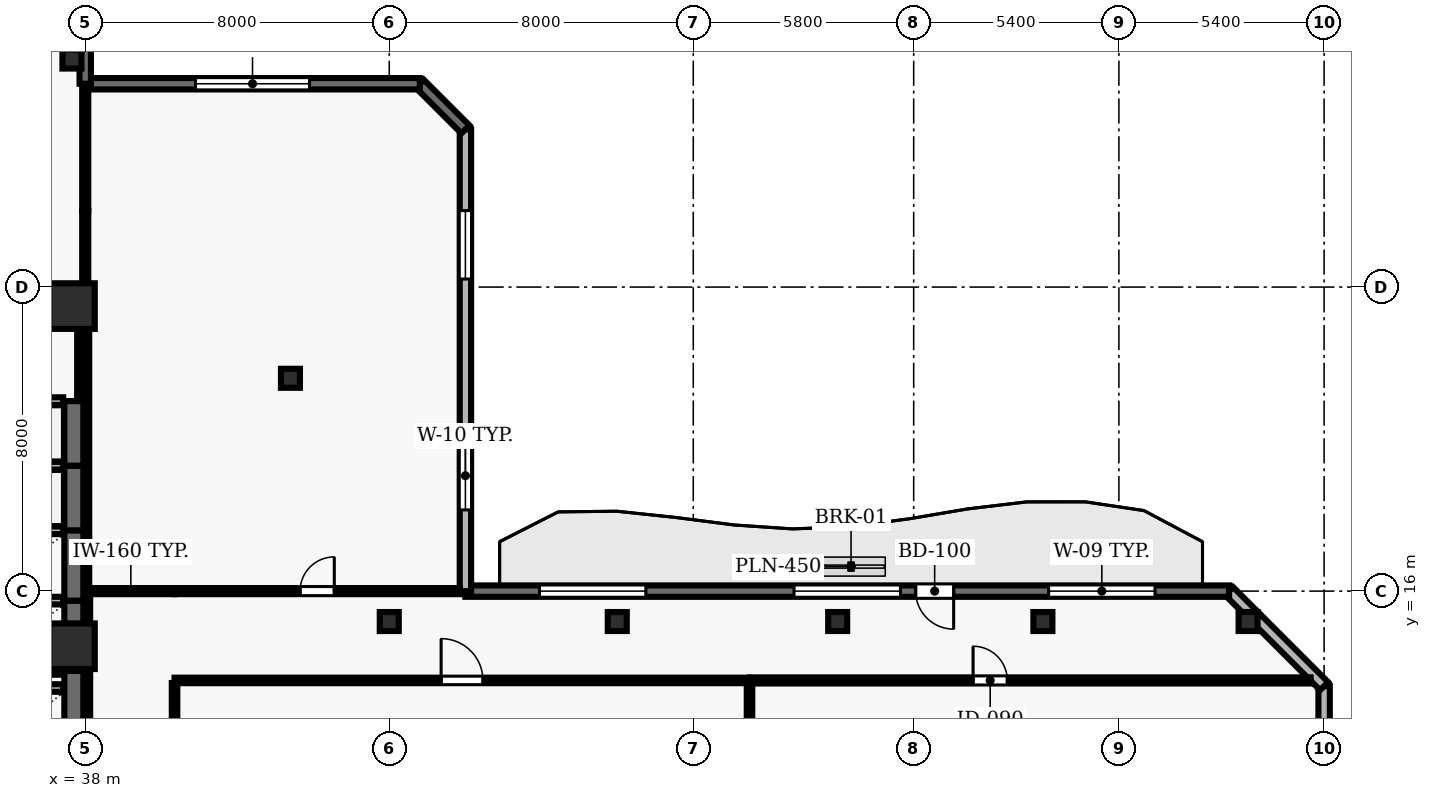
"""IFC4 building model, lengths in metres.
Left out: names, types, materials, properties, quantities, classifications, styles, units other than length and angle.
Written with IfcOpenShell. Run it as: python <this file> out.ifc"""

import sys

from ifc_helpers import new_model, si_unit, direction, frame, frame_2d, origin, origin_2d, place, context, subcontext, project, spatial, rectangle, hollow_rectangle, extrude, element, fill, save


model = new_model("IFC4")
c1 = context("Model", 3, precision=1e-05, world=origin(), true_north=direction((0.0, 1.0)))
c2 = subcontext(c1, "Body", "Model", "MODEL_VIEW")
j1 = project(units=[si_unit("LENGTHUNIT", "METRE"), si_unit("PLANEANGLEUNIT", "RADIAN")], contexts=[c1])
p1 = place(None, origin())
s1 = spatial("IfcSite", under=j1, at=p1, CompositionType="ELEMENT")
p2 = place(p1, origin())
s2 = spatial("IfcBuilding", under=s1, at=p2, CompositionType="ELEMENT")
p3 = place(p2, frame((0.0, 0.0, 119.0)))
s3 = spatial("IfcBuildingStorey", under=s2, at=p3, CompositionType="ELEMENT", Elevation=119.0)
for number, where, z_axis, x_axis in (
    (1, (37.65, 14.55, 0.0), (0.0, 0.0, 1.0), (1.0, 0.0, 0.0)),
    (2, (37.65, 23.5, 0.0), (0.0, 0.0, 1.0), (1.0, 0.0, 0.0)),
):
    element("IfcColumn", number, at=place(p3, frame(where, z_axis=z_axis, x_axis=x_axis)), inside=s3, PredefinedType="COLUMN", context=c2, shape_type="SweptSolid", body=[
        extrude(rectangle(XDim=1.2, YDim=1.2, at=origin_2d()), origin(), (0.0, 0.0, 1.0), 3.9),
    ])
for number, where, z_axis, x_axis in (
    (3, (46.0, 15.2, 0.0), (0.0, 0.0, 1.0), (1.0, 0.0, 0.0)),
    (4, (52.0, 15.2, 0.0), (0.0, 0.0, 1.0), (1.0, 0.0, 0.0)),
    (5, (57.8, 15.2, 0.0), (0.0, 0.0, 1.0), (1.0, 0.0, 0.0)),
    (6, (63.2, 15.2, 0.0), (0.0, 0.0, 1.0), (1.0, 0.0, 0.0)),
    (7, (68.6, 15.2, 0.0), (0.0, 0.0, 1.0), (1.0, 0.0, 0.0)),
    (8, (37.65, 30.0, 0.0), (0.0, 0.0, 1.0), (1.0, 0.0, 0.0)),
    (9, (43.4, 21.6, 0.0), (0.0, 0.0, 1.0), (1.0, 0.0, 0.0)),
):
    element("IfcColumn", number, at=place(p3, frame(where, z_axis=z_axis, x_axis=x_axis)), inside=s3, PredefinedType="COLUMN", context=c2, shape_type="SweptSolid", body=[
        extrude(hollow_rectangle(XDim=0.5, YDim=0.5, WallThickness=0.025, at=origin_2d()), origin(), (0.0, 0.0, 1.0), 3.9),
    ])
p4 = place(p3, frame((70.6, 2.5, 0.0), z_axis=(0.0, 0.0, 1.0), x_axis=(0.0, 1.0, 0.0)))
e10 = element("IfcWall", 10, at=p4, inside=s3, PredefinedType="SOLIDWALL", context=c2, shape_type="SweptSolid", body=[
    extrude(rectangle(XDim=11.0, YDim=0.3, at=frame_2d((5.5, 0.0))), origin(), (0.0, 0.0, 1.0), 3.69),
])
p5 = place(p4, frame((1.85, 0.0, 0.9)))
e11 = element("IfcOpeningElement", 11, at=p5, cuts=e10, PredefinedType="OPENING", context=c2, shape_type="SweptSolid", body=[
    extrude(rectangle(XDim=1.8, YDim=1.8, at=frame_2d((0.9, 0.9))), frame((0.0, 0.16, 0.0), z_axis=(0.0, -1.0, 0.0), x_axis=(1.0, 0.0, 0.0)), (0.0, 0.0, 1.0), 0.32),
])
p6 = place(p4, frame((7.35, 0.0, 0.9)))
e12 = element("IfcOpeningElement", 12, at=p6, cuts=e10, PredefinedType="OPENING", context=c2, shape_type="SweptSolid", body=[
    extrude(rectangle(XDim=1.8, YDim=1.8, at=frame_2d((0.9, 0.9))), frame((0.0, 0.16, 0.0), z_axis=(0.0, -1.0, 0.0), x_axis=(1.0, 0.0, 0.0)), (0.0, 0.0, 1.0), 0.32),
])
p7 = place(p3, frame((70.6, 13.5, 0.0), z_axis=(0.0, 0.0, 1.0), x_axis=(-0.707106781187, 0.707106781187, 0.0)))
e13 = element("IfcWall", 13, at=p7, inside=s3, PredefinedType="SOLIDWALL", context=c2, shape_type="SweptSolid", body=[
    extrude(rectangle(XDim=3.536, YDim=0.3, at=frame_2d((1.768, 0.0))), origin(), (0.0, 0.0, 1.0), 3.69),
])
p8 = place(p3, frame((68.1, 16.0, 0.0), z_axis=(0.0, 0.0, 1.0), x_axis=(-1.0, 0.0, 0.0)))
e14 = element("IfcWall", 14, at=p8, inside=s3, PredefinedType="SOLIDWALL", context=c2, shape_type="SweptSolid", body=[
    extrude(rectangle(XDim=20.096, YDim=0.3, at=frame_2d((10.048, 0.0))), origin(), (0.0, 0.0, 1.0), 3.69),
])
p9 = place(p8, frame((7.248, 0.0, 0.0)))
e15 = element("IfcOpeningElement", 15, at=p9, cuts=e14, PredefinedType="OPENING", context=c2, shape_type="SweptSolid", body=[
    extrude(rectangle(XDim=1.0, YDim=2.2, at=frame_2d((0.5, 1.1))), frame((0.0, 0.16, 0.0), z_axis=(0.0, -1.0, 0.0), x_axis=(1.0, 0.0, 0.0)), (0.0, 0.0, 1.0), 0.32),
])
p10 = place(p8, frame((1.949, 0.0, 0.9)))
e16 = element("IfcOpeningElement", 16, at=p10, cuts=e14, PredefinedType="OPENING", context=c2, shape_type="SweptSolid", body=[
    extrude(rectangle(XDim=2.8, YDim=1.8, at=frame_2d((1.4, 0.9))), frame((0.0, 0.16, 0.0), z_axis=(0.0, -1.0, 0.0), x_axis=(1.0, 0.0, 0.0)), (0.0, 0.0, 1.0), 0.32),
])
p11 = place(p8, frame((8.648, 0.0, 0.9)))
e17 = element("IfcOpeningElement", 17, at=p11, cuts=e14, PredefinedType="OPENING", context=c2, shape_type="SweptSolid", body=[
    extrude(rectangle(XDim=2.8, YDim=1.8, at=frame_2d((1.4, 0.9))), frame((0.0, 0.16, 0.0), z_axis=(0.0, -1.0, 0.0), x_axis=(1.0, 0.0, 0.0)), (0.0, 0.0, 1.0), 0.32),
])
p12 = place(p8, frame((15.347, 0.0, 0.9)))
e18 = element("IfcOpeningElement", 18, at=p12, cuts=e14, PredefinedType="OPENING", context=c2, shape_type="SweptSolid", body=[
    extrude(rectangle(XDim=2.8, YDim=1.8, at=frame_2d((1.4, 0.9))), frame((0.0, 0.16, 0.0), z_axis=(0.0, -1.0, 0.0), x_axis=(1.0, 0.0, 0.0)), (0.0, 0.0, 1.0), 0.32),
])
p13 = place(p3, frame((48.004, 16.0, 0.0), z_axis=(0.0, 0.0, 1.0), x_axis=(0.0, 1.0, 0.0)))
e19 = element("IfcWall", 19, at=p13, inside=s3, PredefinedType="SOLIDWALL", context=c2, shape_type="SweptSolid", body=[
    extrude(rectangle(XDim=12.15, YDim=0.3, at=frame_2d((6.075, 0.0))), origin(), (0.0, 0.0, 1.0), 3.69),
])
p14 = place(p13, frame((2.137, 0.0, 0.9)))
e20 = element("IfcOpeningElement", 20, at=p14, cuts=e19, PredefinedType="OPENING", context=c2, shape_type="SweptSolid", body=[
    extrude(rectangle(XDim=1.8, YDim=2.2, at=frame_2d((0.9, 1.1))), frame((0.0, 0.16, 0.0), z_axis=(0.0, -1.0, 0.0), x_axis=(1.0, 0.0, 0.0)), (0.0, 0.0, 1.0), 0.32),
])
p15 = place(p13, frame((8.212, 0.0, 0.9)))
e21 = element("IfcOpeningElement", 21, at=p15, cuts=e19, PredefinedType="OPENING", context=c2, shape_type="SweptSolid", body=[
    extrude(rectangle(XDim=1.8, YDim=2.2, at=frame_2d((0.9, 1.1))), frame((0.0, 0.16, 0.0), z_axis=(0.0, -1.0, 0.0), x_axis=(1.0, 0.0, 0.0)), (0.0, 0.0, 1.0), 0.32),
])
p16 = place(p3, frame((48.004, 28.15, 0.0), z_axis=(0.0, 0.0, 1.0), x_axis=(-0.707034851297, 0.707178703759, 0.0)))
e22 = element("IfcWall", 22, at=p16, inside=s3, PredefinedType="SOLIDWALL", context=c2, shape_type="SweptSolid", body=[
    extrude(rectangle(XDim=1.697, YDim=0.3, at=frame_2d((0.849, 0.0))), origin(), (0.0, 0.0, 1.0), 3.69),
])
p17 = place(p3, frame((46.804, 29.35, 0.0), z_axis=(0.0, 0.0, 1.0), x_axis=(-1.0, 0.0, 0.0)))
e23 = element("IfcWall", 23, at=p17, inside=s3, PredefinedType="SOLIDWALL", context=c2, shape_type="SweptSolid", body=[
    extrude(rectangle(XDim=8.804, YDim=0.3, at=frame_2d((4.402, 0.0))), origin(), (0.0, 0.0, 1.0), 3.69),
])
p18 = place(p17, frame((2.902, 0.0, 0.9)))
e24 = element("IfcOpeningElement", 24, at=p18, cuts=e23, PredefinedType="OPENING", context=c2, shape_type="SweptSolid", body=[
    extrude(rectangle(XDim=3.0, YDim=2.2, at=frame_2d((1.5, 1.1))), frame((0.0, 0.16, 0.0), z_axis=(0.0, -1.0, 0.0), x_axis=(1.0, 0.0, 0.0)), (0.0, 0.0, 1.0), 0.32),
])
p19 = place(p3, frame((38.0, 29.35, 0.0), z_axis=(0.0, 0.0, 1.0), x_axis=(0.0, 1.0, 0.0)))
e25 = element("IfcWall", 25, at=p19, inside=s3, PredefinedType="SOLIDWALL", context=c2, shape_type="SweptSolid", body=[
    extrude(rectangle(XDim=16.75, YDim=0.3, at=frame_2d((8.375, 0.0))), origin(), (0.0, 0.0, 1.0), 3.69),
])
p20 = place(p19, frame((7.975, 0.0, 0.0)))
e26 = element("IfcOpeningElement", 26, at=p20, cuts=e25, PredefinedType="OPENING", context=c2, shape_type="SweptSolid", body=[
    extrude(rectangle(XDim=1.0, YDim=2.2, at=frame_2d((0.5, 1.1))), frame((0.0, 0.16, 0.0), z_axis=(0.0, -1.0, 0.0), x_axis=(1.0, 0.0, 0.0)), (0.0, 0.0, 1.0), 0.32),
])
p21 = place(p19, frame((2.192, 0.0, 0.9)))
e27 = element("IfcOpeningElement", 27, at=p21, cuts=e25, PredefinedType="OPENING", context=c2, shape_type="SweptSolid", body=[
    extrude(rectangle(XDim=1.2, YDim=1.6, at=frame_2d((0.6, 0.8))), frame((0.0, 0.16, 0.0), z_axis=(0.0, -1.0, 0.0), x_axis=(1.0, 0.0, 0.0)), (0.0, 0.0, 1.0), 0.32),
])
p22 = place(p19, frame((13.358, 0.0, 0.9)))
e28 = element("IfcOpeningElement", 28, at=p22, cuts=e25, PredefinedType="OPENING", context=c2, shape_type="SweptSolid", body=[
    extrude(rectangle(XDim=1.2, YDim=1.6, at=frame_2d((0.6, 0.8))), frame((0.0, 0.16, 0.0), z_axis=(0.0, -1.0, 0.0), x_axis=(1.0, 0.0, 0.0)), (0.0, 0.0, 1.0), 0.32),
])
p23 = place(p3, frame((37.7, 11.55, 0.0), z_axis=(0.0, 0.0, 1.0), x_axis=(0.0, 1.0, 0.0)))
e29 = element("IfcWall", 29, at=p23, inside=s3, PredefinedType="SHEAR", context=c2, shape_type="SweptSolid", body=[
    extrude(rectangle(XDim=2.35, YDim=0.5, at=frame_2d((1.175, 0.0))), origin(), (0.0, 0.0, 1.0), 3.69),
])
p24 = place(p3, frame((37.42, 13.45, 0.0), z_axis=(0.0, 0.0, 1.0), x_axis=(-1.0, 0.0, 0.0)))
e30 = element("IfcWall", 30, at=p24, inside=s3, PredefinedType="SOLIDWALL", context=c2, shape_type="SweptSolid", body=[
    extrude(rectangle(XDim=2.14, YDim=0.2, at=frame_2d((1.07, 0.0))), origin(), (0.0, 0.0, 1.0), 3.69),
])
p25 = place(p3, frame((37.7, 13.9, 0.0), z_axis=(0.0, 0.0, 1.0), x_axis=(0.0, 1.0, 0.0)))
e31 = element("IfcWall", 31, at=p25, inside=s3, PredefinedType="SHEAR", context=c2, shape_type="SweptSolid", body=[
    extrude(rectangle(XDim=1.85, YDim=0.5, at=frame_2d((0.925, 0.0))), origin(), (0.0, 0.0, 1.0), 3.69),
])
for number, where, z_axis, x_axis in (
    (32, (35.28, 13.9, 0.0), (0.0, 0.0, 1.0), (1.0, 0.0, 0.0)),
    (33, (37.42, 15.75, 0.0), (0.0, 0.0, 1.0), (-1.0, 0.0, 0.0)),
):
    element("IfcWall", number, at=place(p3, frame(where, z_axis=z_axis, x_axis=x_axis)), inside=s3, PredefinedType="SOLIDWALL", context=c2, shape_type="SweptSolid", body=[
        extrude(rectangle(XDim=2.14, YDim=0.2, at=frame_2d((1.07, 0.0))), origin(), (0.0, 0.0, 1.0), 3.69),
    ])
p26 = place(p3, frame((37.7, 15.75, 0.0), z_axis=(0.0, 0.0, 1.0), x_axis=(0.0, 1.0, 0.0)))
e34 = element("IfcWall", 34, at=p26, inside=s3, PredefinedType="SHEAR", context=c2, shape_type="SweptSolid", body=[
    extrude(rectangle(XDim=1.85, YDim=0.5, at=frame_2d((0.925, 0.0))), origin(), (0.0, 0.0, 1.0), 3.69),
])
p27 = place(p3, frame((37.42, 17.6, 0.0), z_axis=(0.0, 0.0, 1.0), x_axis=(-1.0, 0.0, 0.0)))
e35 = element("IfcWall", 35, at=p27, inside=s3, PredefinedType="SOLIDWALL", context=c2, shape_type="SweptSolid", body=[
    extrude(rectangle(XDim=2.14, YDim=0.2, at=frame_2d((1.07, 0.0))), origin(), (0.0, 0.0, 1.0), 3.69),
])
p28 = place(p3, frame((37.7, 17.6, 0.0), z_axis=(0.0, 0.0, 1.0), x_axis=(0.0, 1.0, 0.0)))
e36 = element("IfcWall", 36, at=p28, inside=s3, PredefinedType="SHEAR", context=c2, shape_type="SweptSolid", body=[
    extrude(rectangle(XDim=1.7, YDim=0.5, at=frame_2d((0.85, 0.0))), origin(), (0.0, 0.0, 1.0), 3.69),
])
p29 = place(p3, frame((37.42, 19.3, 0.0), z_axis=(0.0, 0.0, 1.0), x_axis=(-1.0, 0.0, 0.0)))
e37 = element("IfcWall", 37, at=p29, inside=s3, PredefinedType="SOLIDWALL", context=c2, shape_type="SweptSolid", body=[
    extrude(rectangle(XDim=2.14, YDim=0.2, at=frame_2d((1.07, 0.0))), origin(), (0.0, 0.0, 1.0), 3.69),
])
p30 = place(p3, frame((37.7, 19.3, 0.0), z_axis=(0.0, 0.0, 1.0), x_axis=(0.0, 1.0, 0.0)))
e38 = element("IfcWall", 38, at=p30, inside=s3, PredefinedType="SHEAR", context=c2, shape_type="SweptSolid", body=[
    extrude(rectangle(XDim=1.7, YDim=0.5, at=frame_2d((0.85, 0.0))), origin(), (0.0, 0.0, 1.0), 3.69),
])
p31 = place(p3, frame((37.42, 21.0, 0.0), z_axis=(0.0, 0.0, 1.0), x_axis=(-1.0, 0.0, 0.0)))
e39 = element("IfcWall", 39, at=p31, inside=s3, PredefinedType="SOLIDWALL", context=c2, shape_type="SweptSolid", body=[
    extrude(rectangle(XDim=2.14, YDim=0.2, at=frame_2d((1.07, 0.0))), origin(), (0.0, 0.0, 1.0), 3.69),
])
p32 = place(p3, frame((37.85, 23.85, 0.0), z_axis=(0.0, 0.0, 1.0), x_axis=(-1.0, 0.0, 0.0)))
e40 = element("IfcWall", 40, at=p32, inside=s3, PredefinedType="PARTITIONING", context=c2, shape_type="SweptSolid", body=[
    extrude(rectangle(XDim=4.0, YDim=0.16, at=frame_2d((2.0, 0.0))), origin(), (0.0, 0.0, 1.0), 3.074),
])
p33 = place(p32, frame((2.25, 0.0, 0.0)))
e41 = element("IfcOpeningElement", 41, at=p33, cuts=e40, PredefinedType="OPENING", context=c2, shape_type="SweptSolid", body=[
    extrude(rectangle(XDim=0.9, YDim=2.1, at=frame_2d((0.45, 1.05))), frame((0.0, 0.09, 0.0), z_axis=(0.0, -1.0, 0.0), x_axis=(1.0, 0.0, 0.0)), (0.0, 0.0, 1.0), 0.18),
])
p34 = place(p3, frame((40.35, 13.65, 0.0), z_axis=(0.0, 0.0, 1.0), x_axis=(1.0, 0.0, 0.0)))
e42 = element("IfcWall", 42, at=p34, inside=s3, PredefinedType="PARTITIONING", context=c2, shape_type="SweptSolid", body=[
    extrude(rectangle(XDim=15.13, YDim=0.145, at=frame_2d((7.565, 0.0))), origin(), (0.0, 0.0, 1.0), 3.69),
])
p35 = place(p34, frame((7.015, 0.0, 0.0)))
e43 = element("IfcOpeningElement", 43, at=p35, cuts=e42, PredefinedType="OPENING", context=c2, shape_type="SweptSolid", body=[
    extrude(rectangle(XDim=1.1, YDim=2.15, at=frame_2d((0.55, 1.075))), frame((0.0, 0.083, 0.0), z_axis=(0.0, -1.0, 0.0), x_axis=(1.0, 0.0, 0.0)), (0.0, 0.0, 1.0), 0.165),
])
p36 = place(p3, frame((40.35, 16.0, 0.0), z_axis=(0.0, 0.0, 1.0), x_axis=(-1.0, 0.0, 0.0)))
e44 = element("IfcWall", 44, at=p36, inside=s3, PredefinedType="PARTITIONING", context=c2, shape_type="SweptSolid", body=[
    extrude(rectangle(XDim=2.3, YDim=0.16, at=frame_2d((1.15, 0.0))), origin(), (0.0, 0.0, 1.0), 3.69),
])
p37 = place(p3, frame((40.35, 16.0, 0.0), z_axis=(0.0, 0.0, 1.0), x_axis=(1.0, 0.0, 0.0)))
e45 = element("IfcWall", 45, at=p37, inside=s3, PredefinedType="PARTITIONING", context=c2, shape_type="SweptSolid", body=[
    extrude(rectangle(XDim=7.509, YDim=0.16, at=frame_2d((3.754, 0.0))), origin(), (0.0, 0.0, 1.0), 3.39),
])
p38 = place(p37, frame((3.304, 0.0, 0.0)))
e46 = element("IfcOpeningElement", 46, at=p38, cuts=e45, PredefinedType="OPENING", context=c2, shape_type="SweptSolid", body=[
    extrude(rectangle(XDim=0.9, YDim=2.1, at=frame_2d((0.45, 1.05))), frame((0.0, 0.09, 0.0), z_axis=(0.0, -1.0, 0.0), x_axis=(1.0, 0.0, 0.0)), (0.0, 0.0, 1.0), 0.18),
])
p39 = place(p3, frame((55.48, 13.65, 0.0), z_axis=(0.0, 0.0, 1.0), x_axis=(1.0, 0.0, 0.0)))
e47 = element("IfcWall", 47, at=p39, inside=s3, PredefinedType="PARTITIONING", context=c2, shape_type="SweptSolid", body=[
    extrude(rectangle(XDim=14.765, YDim=0.16, at=frame_2d((7.383, 0.0))), origin(), (0.0, 0.0, 1.0), 3.69),
])
p40 = place(p39, frame((5.883, 0.0, 0.0)))
e48 = element("IfcOpeningElement", 48, at=p40, cuts=e47, PredefinedType="OPENING", context=c2, shape_type="SweptSolid", body=[
    extrude(rectangle(XDim=0.9, YDim=2.1, at=frame_2d((0.45, 1.05))), frame((0.0, 0.09, 0.0), z_axis=(0.0, -1.0, 0.0), x_axis=(1.0, 0.0, 0.0)), (0.0, 0.0, 1.0), 0.18),
])
p41 = place(p3, frame((37.85, 21.0, 0.0), z_axis=(0.0, 0.0, 1.0), x_axis=(0.0, 1.0, 0.0)))
e49 = element("IfcWall", 49, at=p41, inside=s3, PredefinedType="PARTITIONING", context=c2, shape_type="SweptSolid", body=[
    extrude(rectangle(XDim=2.775, YDim=0.125, at=frame_2d((1.387, 0.0))), origin(), (0.0, 0.0, 1.0), 3.074),
])
p42 = place(p3, frame((38.0, 23.85, 0.0), z_axis=(0.0, 0.0, 1.0), x_axis=(0.0, 1.0, 0.0)))
e50 = element("IfcWall", 50, at=p42, inside=s3, PredefinedType="PARTITIONING", context=c2, shape_type="SweptSolid", body=[
    extrude(rectangle(XDim=2.15, YDim=0.16, at=frame_2d((1.075, 0.0))), origin(), (0.0, 0.0, 1.0), 3.074),
])
p43 = place(p3, frame((38.0, 26.0, 0.0), z_axis=(0.0, 0.0, 1.0), x_axis=(0.0, 1.0, 0.0)))
e51 = element("IfcWall", 51, at=p43, inside=s3, PredefinedType="PARTITIONING", context=c2, shape_type="SweptSolid", body=[
    extrude(rectangle(XDim=3.205, YDim=0.16, at=frame_2d((1.603, 0.0))), origin(), (0.0, 0.0, 1.0), 3.074),
])
p44 = place(p3, frame((38.05, 15.925, 0.0), z_axis=(0.0, 0.0, 1.0), x_axis=(0.0, -1.0, 0.0)))
e52 = element("IfcWall", 52, at=p44, inside=s3, PredefinedType="PARTITIONING", context=c2, shape_type="SweptSolid", body=[
    extrude(rectangle(XDim=6.375, YDim=0.16, at=frame_2d((3.188, 0.0))), origin(), (0.0, 0.0, 1.0), 3.074),
])
p45 = place(p3, frame((38.05, 23.85, 0.0), z_axis=(0.0, 0.0, 1.0), x_axis=(0.0, -1.0, 0.0)))
e53 = element("IfcWall", 53, at=p45, inside=s3, PredefinedType="MOVABLE", context=c2, shape_type="SweptSolid", body=[
    extrude(rectangle(XDim=7.775, YDim=0.11, at=frame_2d((3.888, 0.0))), origin(), (0.0, 0.0, 1.0), 3.074),
])
p46 = place(p3, frame((40.35, 8.018, 0.0), z_axis=(0.0, 0.0, 1.0), x_axis=(0.0, 1.0, 0.0)))
e54 = element("IfcWall", 54, at=p46, inside=s3, PredefinedType="PARTITIONING", context=c2, shape_type="SweptSolid", body=[
    extrude(rectangle(XDim=5.564, YDim=0.145, at=frame_2d((2.782, 0.0))), origin(), (0.0, 0.0, 1.0), 3.69),
])
p47 = place(p3, frame((55.48, 8.035, 0.0), z_axis=(0.0, 0.0, 1.0), x_axis=(0.0, 1.0, 0.0)))
e55 = element("IfcWall", 55, at=p47, inside=s3, PredefinedType="PARTITIONING", context=c2, shape_type="SweptSolid", body=[
    extrude(rectangle(XDim=5.54, YDim=0.145, at=frame_2d((2.77, 0.0))), origin(), (0.0, 0.0, 1.0), 3.69),
])
p48 = place(p9, origin())
e56 = element("IfcDoor", 56, at=p48, inside=s3, OperationType="SINGLE_SWING_LEFT", PredefinedType="DOOR", context=c2, shape_type="SweptSolid", body=[
    extrude(rectangle(XDim=1.0, YDim=2.2, at=frame_2d((0.5, 1.1))), frame((0.0, 0.025, 0.0), z_axis=(0.0, -1.0, 0.0), x_axis=(1.0, 0.0, 0.0)), (0.0, 0.0, 1.0), 0.05),
])
fill(e15, e56)
p49 = place(p10, origin())
e57 = element("IfcWindow", 57, at=p49, inside=s3, PartitioningType="SINGLE_PANEL", PredefinedType="WINDOW", context=c2, shape_type="SweptSolid", body=[
    extrude(rectangle(XDim=2.8, YDim=1.8, at=frame_2d((1.4, 0.9))), frame((0.0, 0.03, 0.0), z_axis=(0.0, -1.0, 0.0), x_axis=(1.0, 0.0, 0.0)), (0.0, 0.0, 1.0), 0.06),
])
fill(e16, e57)
p50 = place(p11, origin())
e58 = element("IfcWindow", 58, at=p50, inside=s3, PartitioningType="SINGLE_PANEL", PredefinedType="WINDOW", context=c2, shape_type="SweptSolid", body=[
    extrude(rectangle(XDim=2.8, YDim=1.8, at=frame_2d((1.4, 0.9))), frame((0.0, 0.03, 0.0), z_axis=(0.0, -1.0, 0.0), x_axis=(1.0, 0.0, 0.0)), (0.0, 0.0, 1.0), 0.06),
])
fill(e17, e58)
p51 = place(p12, origin())
e59 = element("IfcWindow", 59, at=p51, inside=s3, PartitioningType="SINGLE_PANEL", PredefinedType="WINDOW", context=c2, shape_type="SweptSolid", body=[
    extrude(rectangle(XDim=2.8, YDim=1.8, at=frame_2d((1.4, 0.9))), frame((0.0, 0.03, 0.0), z_axis=(0.0, -1.0, 0.0), x_axis=(1.0, 0.0, 0.0)), (0.0, 0.0, 1.0), 0.06),
])
fill(e18, e59)
p52 = place(p14, origin())
e60 = element("IfcWindow", 60, at=p52, inside=s3, PartitioningType="SINGLE_PANEL", PredefinedType="WINDOW", context=c2, shape_type="SweptSolid", body=[
    extrude(rectangle(XDim=1.8, YDim=2.2, at=frame_2d((0.9, 1.1))), frame((0.0, 0.03, 0.0), z_axis=(0.0, -1.0, 0.0), x_axis=(1.0, 0.0, 0.0)), (0.0, 0.0, 1.0), 0.06),
])
fill(e20, e60)
p53 = place(p15, origin())
e61 = element("IfcWindow", 61, at=p53, inside=s3, PartitioningType="SINGLE_PANEL", PredefinedType="WINDOW", context=c2, shape_type="SweptSolid", body=[
    extrude(rectangle(XDim=1.8, YDim=2.2, at=frame_2d((0.9, 1.1))), frame((0.0, 0.03, 0.0), z_axis=(0.0, -1.0, 0.0), x_axis=(1.0, 0.0, 0.0)), (0.0, 0.0, 1.0), 0.06),
])
fill(e21, e61)
p54 = place(p18, origin())
e62 = element("IfcWindow", 62, at=p54, inside=s3, PartitioningType="SINGLE_PANEL", PredefinedType="WINDOW", context=c2, shape_type="SweptSolid", body=[
    extrude(rectangle(XDim=3.0, YDim=2.2, at=frame_2d((1.5, 1.1))), frame((0.0, 0.03, 0.0), z_axis=(0.0, -1.0, 0.0), x_axis=(1.0, 0.0, 0.0)), (0.0, 0.0, 1.0), 0.06),
])
fill(e24, e62)
p55 = place(p35, origin())
e63 = element("IfcDoor", 63, at=p55, inside=s3, OperationType="SINGLE_SWING_LEFT", PredefinedType="DOOR", context=c2, shape_type="SweptSolid", body=[
    extrude(rectangle(XDim=1.1, YDim=2.15, at=frame_2d((0.55, 1.075))), frame((0.0, 0.025, 0.0), z_axis=(0.0, -1.0, 0.0), x_axis=(1.0, 0.0, 0.0)), (0.0, 0.0, 1.0), 0.05),
])
fill(e43, e63)
p56 = place(p40, origin())
e64 = element("IfcDoor", 64, at=p56, inside=s3, OperationType="SINGLE_SWING_LEFT", PredefinedType="DOOR", context=c2, shape_type="SweptSolid", body=[
    extrude(rectangle(XDim=0.9, YDim=2.1, at=frame_2d((0.45, 1.05))), frame((0.0, 0.025, 0.0), z_axis=(0.0, -1.0, 0.0), x_axis=(1.0, 0.0, 0.0)), (0.0, 0.0, 1.0), 0.05),
])
fill(e48, e64)
p57 = place(p38, origin())
e65 = element("IfcDoor", 65, at=p57, inside=s3, OperationType="SINGLE_SWING_RIGHT", PredefinedType="DOOR", context=c2, shape_type="SweptSolid", body=[
    extrude(rectangle(XDim=0.9, YDim=2.1, at=frame_2d((0.45, 1.05))), frame((0.0, 0.025, 0.0), z_axis=(0.0, -1.0, 0.0), x_axis=(1.0, 0.0, 0.0)), (0.0, 0.0, 1.0), 0.05),
])
fill(e46, e65)
save(model, sys.argv[1])
